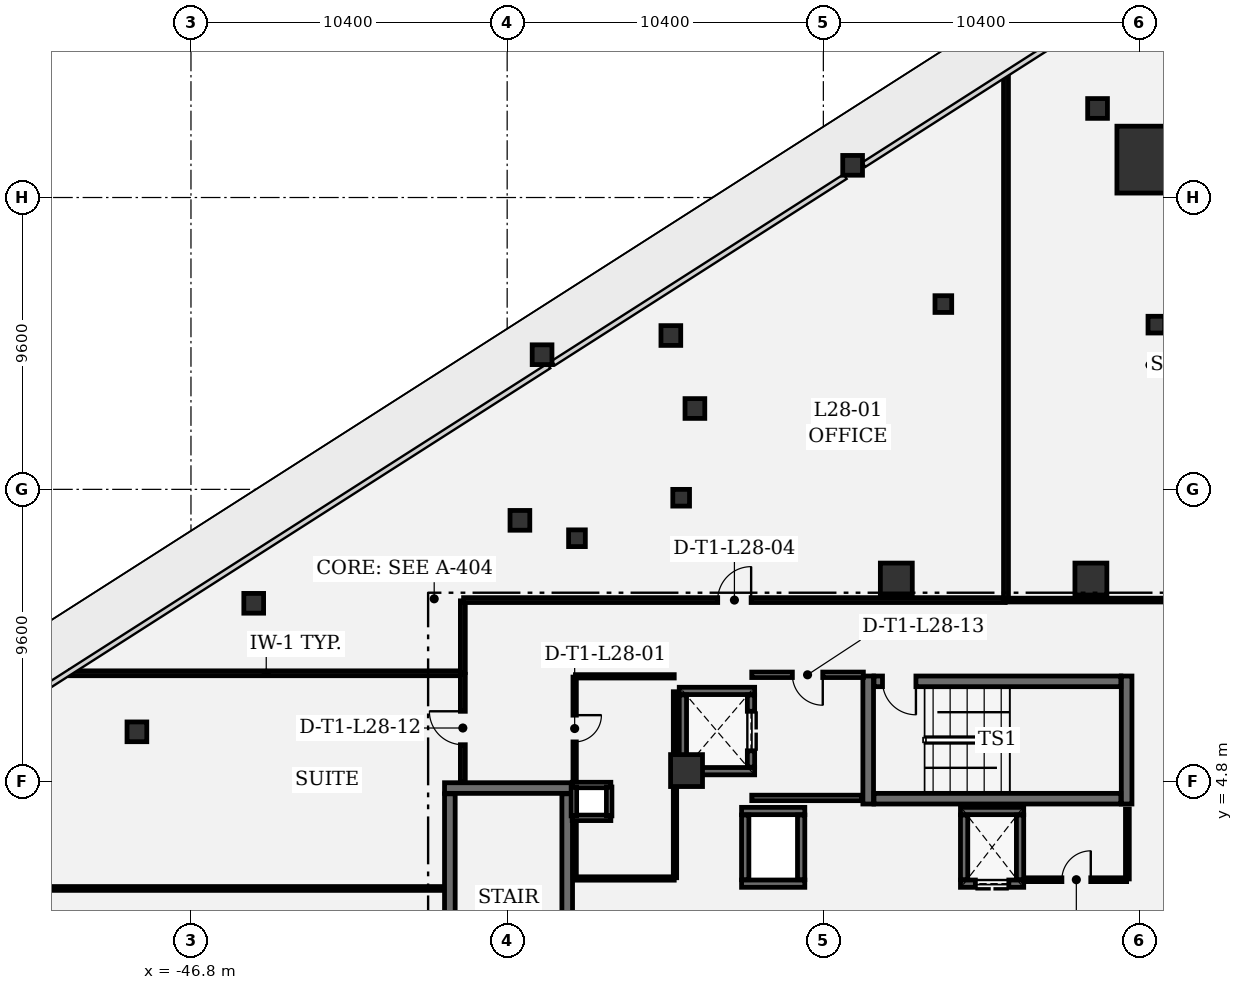
"""IFC4 building model, lengths in metres.
Left out: names, types, materials, properties, quantities, classifications, styles, units other than length and angle.
Written with IfcOpenShell. Run it as: python <this file> out.ifc"""

import sys

from ifc_helpers import new_model, si_unit, direction, frame, frame_2d, origin, origin_2d, place, context, subcontext, project, spatial, rectangle, extrude, element, fill, save


model = new_model("IFC4")
c1 = context("Model", 3, precision=1e-05, world=origin(), true_north=direction((0.0, 1.0)))
c2 = subcontext(c1, "Body", "Model", "MODEL_VIEW")
j1 = project(units=[si_unit("LENGTHUNIT", "METRE"), si_unit("PLANEANGLEUNIT", "RADIAN")], contexts=[c1])
p1 = place(None, origin())
s1 = spatial("IfcSite", under=j1, at=p1, CompositionType="ELEMENT")
p2 = place(p1, origin())
s2 = spatial("IfcBuilding", under=s1, at=p2, CompositionType="ELEMENT")
p3 = place(p2, frame((0.0, 0.0, 126.0)))
s3 = spatial("IfcBuildingStorey", under=s2, at=p3, CompositionType="ELEMENT", Elevation=126.0)
p4 = place(p3, frame((-15.344, 25.246, 0.0), z_axis=(0.0, 0.0, 1.0), x_axis=(1.0, 0.0, 0.0)))
e1 = element("IfcColumn", 1, at=p4, inside=s3, PredefinedType="COLUMN", context=c2, shape_type="SweptSolid", body=[
    extrude(rectangle(XDim=2.0, YDim=2.2, at=origin_2d()), origin(), (0.0, 0.0, 1.0), 4.05),
])
for number, where, z_axis, x_axis in (
    (2, (-23.6, 11.45, 0.0), (0.0, 0.0, 1.0), (1.0, 0.0, 0.0)),
    (3, (-17.2, 11.45, 0.0), (0.0, 0.0, 1.0), (1.0, 0.0, 0.0)),
    (4, (-30.5, 5.15, 0.0), (0.0, 0.0, 1.0), (1.0, 0.0, 0.0)),
):
    element("IfcColumn", number, at=place(p3, frame(where, z_axis=z_axis, x_axis=x_axis)), inside=s3, PredefinedType="COLUMN", context=c2, shape_type="SweptSolid", body=[
        extrude(rectangle(XDim=1.05, YDim=1.05, at=origin_2d()), origin(), (0.0, 0.0, 1.0), 4.05),
    ])
for number, where, z_axis, x_axis in (
    (5, (-35.252, 18.829, 0.0), (0.0, 0.0, 1.0), (1.0, 0.0, 0.0)),
    (6, (-25.038, 25.059, 0.0), (0.0, 0.0, 1.0), (1.0, 0.0, 0.0)),
    (7, (-31.016, 19.46, 0.0), (0.0, 0.0, 1.0), (1.0, 0.0, 0.0)),
    (8, (-44.736, 10.652, 0.0), (0.0, 0.0, 1.0), (1.0, 0.0, 0.0)),
    (9, (-48.578, 6.425, 0.0), (0.0, 0.0, 1.0), (1.0, 0.0, 0.0)),
    (10, (-16.981, 26.929, 0.0), (0.0, 0.0, 1.0), (1.0, 0.0, 0.0)),
    (11, (-35.981, 13.381, 0.0), (0.0, 0.0, 1.0), (1.0, 0.0, 0.0)),
    (12, (-30.225, 17.06, 0.0), (0.0, 0.0, 1.0), (1.0, 0.0, 0.0)),
):
    element("IfcColumn", number, at=place(p3, frame(where, z_axis=z_axis, x_axis=x_axis)), inside=s3, PredefinedType="COLUMN", context=c2, shape_type="SweptSolid", body=[
        extrude(rectangle(XDim=0.65, YDim=0.65, at=origin_2d()), origin(), (0.0, 0.0, 1.0), 4.05),
    ])
for number, where, z_axis, x_axis in (
    (13, (-34.104, 12.792, 0.0), (0.0, 0.0, 1.0), (1.0, 0.0, 0.0)),
    (14, (-22.053, 20.495, 0.0), (0.0, 0.0, 1.0), (1.0, 0.0, 0.0)),
    (15, (-30.677, 14.124, 0.0), (0.0, 0.0, 1.0), (1.0, 0.0, 0.0)),
    (16, (-15.046, 19.818, 0.0), (0.0, 0.0, 1.0), (1.0, 0.0, 0.0)),
):
    element("IfcColumn", number, at=place(p3, frame(where, z_axis=z_axis, x_axis=x_axis)), inside=s3, PredefinedType="COLUMN", context=c2, shape_type="SweptSolid", body=[
        extrude(rectangle(XDim=0.55, YDim=0.55, at=origin_2d()), origin(), (0.0, 0.0, 1.0), 4.05),
    ])
for number, where, z_axis, x_axis in (
    (17, (-24.525, 8.26, 0.0), (0.0, 0.0, 1.0), (0.0, -1.0, 0.0)),
    (18, (-16.025, 4.05, 0.0), (0.0, 0.0, 1.0), (0.0, 1.0, 0.0)),
):
    element("IfcWall", number, at=place(p3, frame(where, z_axis=z_axis, x_axis=x_axis)), inside=s3, PredefinedType="SHEAR", context=c2, shape_type="SweptSolid", body=[
        extrude(rectangle(XDim=4.21, YDim=0.35, at=frame_2d((2.105, 0.0))), origin(), (0.0, 0.0, 1.0), 3.77),
    ])
p5 = place(p3, frame((-24.335, 4.225, 0.0), z_axis=(0.0, 0.0, 1.0), x_axis=(1.0, 0.0, 0.0)))
e19 = element("IfcWall", 19, at=p5, inside=s3, PredefinedType="SHEAR", context=c2, shape_type="SweptSolid", body=[
    extrude(rectangle(XDim=8.12, YDim=0.35, at=frame_2d((4.06, 0.0))), origin(), (0.0, 0.0, 1.0), 3.77),
])
p6 = place(p3, frame((-16.215, 8.085, 0.0), z_axis=(0.0, 0.0, 1.0), x_axis=(-1.0, 0.0, 0.0)))
e20 = element("IfcWall", 20, at=p6, inside=s3, PredefinedType="SHEAR", context=c2, shape_type="SweptSolid", body=[
    extrude(rectangle(XDim=8.12, YDim=0.35, at=frame_2d((4.06, 0.0))), origin(), (0.0, 0.0, 1.0), 3.77),
])
p7 = place(p6, frame((6.74, 0.0, 0.0)))
e21 = element("IfcOpeningElement", 21, at=p7, cuts=e20, PredefinedType="OPENING", context=c2, shape_type="SweptSolid", body=[
    extrude(rectangle(XDim=1.1, YDim=2.2, at=frame_2d((0.55, 1.1))), frame((0.0, 0.185, 0.0), z_axis=(0.0, -1.0, 0.0), x_axis=(1.0, 0.0, 0.0)), (0.0, 0.0, 1.0), 0.37),
])
p8 = place(p3, frame((-34.25, 4.575, 0.0), z_axis=(0.0, 0.0, 1.0), x_axis=(-1.0, 0.0, 0.0)))
e22 = element("IfcWall", 22, at=p8, inside=s3, PredefinedType="SHEAR", context=c2, shape_type="SweptSolid", body=[
    extrude(rectangle(XDim=4.21, YDim=0.35, at=frame_2d((2.105, 0.0))), origin(), (0.0, 0.0, 1.0), 3.77),
])
for number, where, z_axis, x_axis in (
    (23, (-34.425, -4.385, 0.0), (0.0, 0.0, 1.0), (0.0, 1.0, 0.0)),
    (24, (-38.285, 4.385, 0.0), (0.0, 0.0, 1.0), (0.0, -1.0, 0.0)),
):
    element("IfcWall", number, at=place(p3, frame(where, z_axis=z_axis, x_axis=x_axis)), inside=s3, PredefinedType="SHEAR", context=c2, shape_type="SweptSolid", body=[
        extrude(rectangle(XDim=8.77, YDim=0.35, at=frame_2d((4.385, 0.0))), origin(), (0.0, 0.0, 1.0), 3.77),
    ])
for number, where, z_axis, x_axis in (
    (25, (-28.26, 5.13, 0.0), (0.0, 0.0, 1.0), (-1.0, 0.0, 0.0)),
    (26, (-30.74, 7.77, 0.0), (0.0, 0.0, 1.0), (1.0, 0.0, 0.0)),
):
    element("IfcWall", number, at=place(p3, frame(where, z_axis=z_axis, x_axis=x_axis)), inside=s3, PredefinedType="SHEAR", context=c2, shape_type="SweptSolid", body=[
        extrude(rectangle(XDim=2.48, YDim=0.24, at=frame_2d((1.24, 0.0))), origin(), (0.0, 0.0, 1.0), 3.77),
    ])
p9 = place(p3, frame((-30.62, 5.262, 0.0), z_axis=(0.0, 0.0, 1.0), x_axis=(0.0, 1.0, 0.0)))
e27 = element("IfcWall", 27, at=p9, inside=s3, PredefinedType="SHEAR", context=c2, shape_type="SweptSolid", body=[
    extrude(rectangle(XDim=2.376, YDim=0.24, at=frame_2d((1.188, 0.0))), origin(), (0.0, 0.0, 1.0), 3.77),
])
p10 = place(p3, frame((-28.38, 7.638, 0.0), z_axis=(0.0, 0.0, 1.0), x_axis=(0.0, -1.0, 0.0)))
e28 = element("IfcWall", 28, at=p10, inside=s3, PredefinedType="SHEAR", context=c2, shape_type="SweptSolid", body=[
    extrude(rectangle(XDim=2.376, YDim=0.24, at=frame_2d((1.188, 0.0))), origin(), (0.0, 0.0, 1.0), 3.77),
])
p11 = place(p10, frame((0.538, 0.0, 0.0)))
e29 = element("IfcOpeningElement", 29, at=p11, cuts=e28, PredefinedType="OPENING", context=c2, shape_type="SweptSolid", body=[
    extrude(rectangle(XDim=1.3, YDim=2.3, at=frame_2d((0.65, 1.15))), frame((0.0, 0.13, 0.0), z_axis=(0.0, -1.0, 0.0), x_axis=(1.0, 0.0, 0.0)), (0.0, 0.0, 1.0), 0.26),
])
for number, where, z_axis, x_axis in (
    (30, (-26.61, 1.43, 0.0), (0.0, 0.0, 1.0), (-1.0, 0.0, 0.0)),
    (31, (-28.69, 3.82, 0.0), (0.0, 0.0, 1.0), (1.0, 0.0, 0.0)),
):
    element("IfcWall", number, at=place(p3, frame(where, z_axis=z_axis, x_axis=x_axis)), inside=s3, PredefinedType="SHEAR", context=c2, shape_type="SweptSolid", body=[
        extrude(rectangle(XDim=2.08, YDim=0.24, at=frame_2d((1.04, 0.0))), origin(), (0.0, 0.0, 1.0), 3.77),
    ])
for number, where, z_axis, x_axis in (
    (32, (-28.57, 1.562, 0.0), (0.0, 0.0, 1.0), (0.0, 1.0, 0.0)),
    (33, (-26.73, 3.688, 0.0), (0.0, 0.0, 1.0), (0.0, -1.0, 0.0)),
):
    element("IfcWall", number, at=place(p3, frame(where, z_axis=z_axis, x_axis=x_axis)), inside=s3, PredefinedType="SHEAR", context=c2, shape_type="SweptSolid", body=[
        extrude(rectangle(XDim=2.126, YDim=0.24, at=frame_2d((1.063, 0.0))), origin(), (0.0, 0.0, 1.0), 3.77),
    ])
p12 = place(p3, frame((-19.41, 1.43, 0.0), z_axis=(0.0, 0.0, 1.0), x_axis=(-1.0, 0.0, 0.0)))
e34 = element("IfcWall", 34, at=p12, inside=s3, PredefinedType="SHEAR", context=c2, shape_type="SweptSolid", body=[
    extrude(rectangle(XDim=2.08, YDim=0.24, at=frame_2d((1.04, 0.0))), origin(), (0.0, 0.0, 1.0), 3.77),
])
p13 = place(p12, frame((0.49, 0.0, 0.0)))
e35 = element("IfcOpeningElement", 35, at=p13, cuts=e34, PredefinedType="OPENING", context=c2, shape_type="SweptSolid", body=[
    extrude(rectangle(XDim=1.1, YDim=2.2, at=frame_2d((0.55, 1.1))), frame((0.0, 0.13, 0.0), z_axis=(0.0, -1.0, 0.0), x_axis=(1.0, 0.0, 0.0)), (0.0, 0.0, 1.0), 0.26),
])
p14 = place(p3, frame((-21.49, 3.82, 0.0), z_axis=(0.0, 0.0, 1.0), x_axis=(1.0, 0.0, 0.0)))
e36 = element("IfcWall", 36, at=p14, inside=s3, PredefinedType="SHEAR", context=c2, shape_type="SweptSolid", body=[
    extrude(rectangle(XDim=2.08, YDim=0.24, at=frame_2d((1.04, 0.0))), origin(), (0.0, 0.0, 1.0), 3.77),
])
for number, where, z_axis, x_axis in (
    (37, (-21.37, 1.562, 0.0), (0.0, 0.0, 1.0), (0.0, 1.0, 0.0)),
    (38, (-19.53, 3.688, 0.0), (0.0, 0.0, 1.0), (0.0, -1.0, 0.0)),
):
    element("IfcWall", number, at=place(p3, frame(where, z_axis=z_axis, x_axis=x_axis)), inside=s3, PredefinedType="SHEAR", context=c2, shape_type="SweptSolid", body=[
        extrude(rectangle(XDim=2.126, YDim=0.24, at=frame_2d((1.063, 0.0))), origin(), (0.0, 0.0, 1.0), 3.77),
    ])
for number, where, z_axis, x_axis in (
    (39, (-32.99, 3.595, 0.0), (0.0, 0.0, 1.0), (-1.0, 0.0, 0.0)),
    (40, (-34.26, 4.675, 0.0), (0.0, 0.0, 1.0), (1.0, 0.0, 0.0)),
):
    element("IfcWall", number, at=place(p3, frame(where, z_axis=z_axis, x_axis=x_axis)), inside=s3, PredefinedType="PARTITIONING", context=c2, shape_type="SweptSolid", body=[
        extrude(rectangle(XDim=1.27, YDim=0.18, at=frame_2d((0.635, 0.0))), origin(), (0.0, 0.0, 1.0), 3.77),
    ])
for number, where, z_axis, x_axis in (
    (41, (-34.205, 3.66, 0.0), (0.0, 0.0, 1.0), (0.0, 1.0, 0.0)),
    (42, (-33.045, 4.61, 0.0), (0.0, 0.0, 1.0), (0.0, -1.0, 0.0)),
):
    element("IfcWall", number, at=place(p3, frame(where, z_axis=z_axis, x_axis=x_axis)), inside=s3, PredefinedType="PARTITIONING", context=c2, shape_type="SweptSolid", body=[
        extrude(rectangle(XDim=0.95, YDim=0.18, at=frame_2d((0.475, 0.0))), origin(), (0.0, 0.0, 1.0), 3.77),
    ])
p15 = place(p3, frame((-28.355, 4.25, 0.0), z_axis=(0.0, 0.0, 1.0), x_axis=(1.0, 0.0, 0.0)))
e43 = element("IfcWall", 43, at=p15, inside=s3, PredefinedType="PARTITIONING", context=c2, shape_type="SweptSolid", body=[
    extrude(rectangle(XDim=3.622, YDim=0.18, at=frame_2d((1.811, 0.0))), origin(), (0.0, 0.0, 1.0), 3.77),
])
p16 = place(p3, frame((-24.684, 8.3, 0.0), z_axis=(0.0, 0.0, 1.0), x_axis=(-1.0, 0.0, 0.0)))
e44 = element("IfcWall", 44, at=p16, inside=s3, PredefinedType="PARTITIONING", context=c2, shape_type="SweptSolid", body=[
    extrude(rectangle(XDim=3.671, YDim=0.18, at=frame_2d((1.835, 0.0))), origin(), (0.0, 0.0, 1.0), 3.77),
])
p17 = place(p16, frame((1.335, 0.0, 0.0)))
e45 = element("IfcOpeningElement", 45, at=p17, cuts=e44, PredefinedType="OPENING", context=c2, shape_type="SweptSolid", body=[
    extrude(rectangle(XDim=1.0, YDim=2.15, at=frame_2d((0.5, 1.075))), frame((0.0, 0.1, 0.0), z_axis=(0.0, -1.0, 0.0), x_axis=(1.0, 0.0, 0.0)), (0.0, 0.0, 1.0), 0.2),
])
p18 = place(p3, frame((-34.155, 1.6, 0.0), z_axis=(0.0, 0.0, 1.0), x_axis=(1.0, 0.0, 0.0)))
e46 = element("IfcWall", 46, at=p18, inside=s3, PredefinedType="PARTITIONING", context=c2, shape_type="SweptSolid", body=[
    extrude(rectangle(XDim=3.25, YDim=0.11, at=frame_2d((1.625, 0.0))), origin(), (0.0, 0.0, 1.0), 3.77),
])
p19 = place(p3, frame((-30.88, 1.625, 0.0), z_axis=(0.0, 0.0, 1.0), x_axis=(0.0, 1.0, 0.0)))
e47 = element("IfcWall", 47, at=p19, inside=s3, PredefinedType="PARTITIONING", context=c2, shape_type="SweptSolid", body=[
    extrude(rectangle(XDim=2.935, YDim=0.11, at=frame_2d((1.468, 0.0))), origin(), (0.0, 0.0, 1.0), 3.77),
])
p20 = place(p3, frame((-30.88, 5.74, 0.0), z_axis=(0.0, 0.0, 1.0), x_axis=(0.0, 1.0, 0.0)))
e48 = element("IfcWall", 48, at=p20, inside=s3, PredefinedType="PARTITIONING", context=c2, shape_type="SweptSolid", body=[
    extrude(rectangle(XDim=2.003, YDim=0.11, at=frame_2d((1.001, 0.0))), origin(), (0.0, 0.0, 1.0), 3.77),
])
p21 = place(p3, frame((-30.905, 8.25, 0.0), z_axis=(0.0, 0.0, 1.0), x_axis=(-1.0, 0.0, 0.0)))
e49 = element("IfcWall", 49, at=p21, inside=s3, PredefinedType="PARTITIONING", context=c2, shape_type="SweptSolid", body=[
    extrude(rectangle(XDim=3.25, YDim=0.11, at=frame_2d((1.625, 0.0))), origin(), (0.0, 0.0, 1.0), 3.77),
])
p22 = place(p3, frame((-34.18, 8.225, 0.0), z_axis=(0.0, 0.0, 1.0), x_axis=(0.0, -1.0, 0.0)))
e50 = element("IfcWall", 50, at=p22, inside=s3, PredefinedType="PARTITIONING", context=c2, shape_type="SweptSolid", body=[
    extrude(rectangle(XDim=3.385, YDim=0.11, at=frame_2d((1.692, 0.0))), origin(), (0.0, 0.0, 1.0), 3.77),
])
p23 = place(p22, frame((1.252, 0.0, 0.0)))
e51 = element("IfcOpeningElement", 51, at=p23, cuts=e50, PredefinedType="OPENING", context=c2, shape_type="SweptSolid", body=[
    extrude(rectangle(XDim=0.88, YDim=2.1, at=frame_2d((0.44, 1.05))), frame((0.0, 0.065, 0.0), z_axis=(0.0, -1.0, 0.0), x_axis=(1.0, 0.0, 0.0)), (0.0, 0.0, 1.0), 0.13),
])
p24 = place(p3, frame((-34.18, 3.43, 0.0), z_axis=(0.0, 0.0, 1.0), x_axis=(0.0, -1.0, 0.0)))
e52 = element("IfcWall", 52, at=p24, inside=s3, PredefinedType="PARTITIONING", context=c2, shape_type="SweptSolid", body=[
    extrude(rectangle(XDim=1.805, YDim=0.11, at=frame_2d((0.902, 0.0))), origin(), (0.0, 0.0, 1.0), 3.77),
])
p25 = place(p3, frame((-19.334, 1.56, 0.0), z_axis=(0.0, 0.0, 1.0), x_axis=(1.0, 0.0, 0.0)))
e53 = element("IfcWall", 53, at=p25, inside=s3, PredefinedType="PARTITIONING", context=c2, shape_type="SweptSolid", body=[
    extrude(rectangle(XDim=3.309, YDim=0.125, at=frame_2d((1.654, 0.0))), origin(), (0.0, 0.0, 1.0), 3.77),
])
p26 = place(p25, frame((1.179, 0.0, 0.0)))
e54 = element("IfcOpeningElement", 54, at=p26, cuts=e53, PredefinedType="OPENING", context=c2, shape_type="SweptSolid", body=[
    extrude(rectangle(XDim=0.95, YDim=2.15, at=frame_2d((0.475, 1.075))), frame((0.0, 0.073, 0.0), z_axis=(0.0, -1.0, 0.0), x_axis=(1.0, 0.0, 0.0)), (0.0, 0.0, 1.0), 0.145),
])
p27 = place(p3, frame((-16.0, 1.585, 0.0), z_axis=(0.0, 0.0, 1.0), x_axis=(0.0, 1.0, 0.0)))
e55 = element("IfcWall", 55, at=p27, inside=s3, PredefinedType="PARTITIONING", context=c2, shape_type="SweptSolid", body=[
    extrude(rectangle(XDim=2.302, YDim=0.125, at=frame_2d((1.151, 0.0))), origin(), (0.0, 0.0, 1.0), 3.77),
])
p28 = place(p3, frame((-50.766, 8.35, 0.0), z_axis=(0.0, 0.0, 1.0), x_axis=(1.0, 0.0, 0.0)))
e56 = element("IfcWall", 56, at=p28, inside=s3, PredefinedType="PARTITIONING", context=c2, shape_type="SweptSolid", body=[
    extrude(rectangle(XDim=12.883, YDim=0.16, at=frame_2d((6.442, 0.0))), origin(), (0.0, 0.0, 1.0), 2.89),
])
p29 = place(p3, frame((-37.858, 10.733, 0.0), z_axis=(0.0, 0.0, 1.0), x_axis=(0.0, -1.0, 0.0)))
e57 = element("IfcWall", 57, at=p29, inside=s3, PredefinedType="PARTITIONING", context=c2, shape_type="SweptSolid", body=[
    extrude(rectangle(XDim=2.358, YDim=0.16, at=frame_2d((1.179, 0.0))), origin(), (0.0, 0.0, 1.0), 3.77),
])
p30 = place(p3, frame((-37.833, 10.758, 0.0), z_axis=(0.0, 0.0, 1.0), x_axis=(1.0, 0.0, 0.0)))
e58 = element("IfcWall", 58, at=p30, inside=s3, PredefinedType="PARTITIONING", context=c2, shape_type="SweptSolid", body=[
    extrude(rectangle(XDim=17.815, YDim=0.16, at=frame_2d((8.908, 0.0))), origin(), (0.0, 0.0, 1.0), 3.334),
])
p31 = place(p30, frame((8.358, 0.0, 0.0)))
e59 = element("IfcOpeningElement", 59, at=p31, cuts=e58, PredefinedType="OPENING", context=c2, shape_type="SweptSolid", body=[
    extrude(rectangle(XDim=1.1, YDim=2.15, at=frame_2d((0.55, 1.075))), frame((0.0, 0.09, 0.0), z_axis=(0.0, -1.0, 0.0), x_axis=(1.0, 0.0, 0.0)), (0.0, 0.0, 1.0), 0.18),
])
p32 = place(p3, frame((-19.993, 10.783, 0.0), z_axis=(0.0, 0.0, 1.0), x_axis=(0.0, 1.0, 0.0)))
e60 = element("IfcWall", 60, at=p32, inside=s3, PredefinedType="PARTITIONING", context=c2, shape_type="SweptSolid", body=[
    extrude(rectangle(XDim=17.206, YDim=0.16, at=frame_2d((8.603, 0.0))), origin(), (0.0, 0.0, 1.0), 2.885),
])
p33 = place(p3, frame((-19.96, 10.758, 0.0), z_axis=(0.0, 0.0, 1.0), x_axis=(1.0, 0.0, 0.0)))
e61 = element("IfcWall", 61, at=p33, inside=s3, PredefinedType="PARTITIONING", context=c2, shape_type="SweptSolid", body=[
    extrude(rectangle(XDim=23.24, YDim=0.125, at=frame_2d((11.62, 0.0))), origin(), (0.0, 0.0, 1.0), 2.885),
])
p34 = place(p33, frame((11.145, 0.0, 0.0)))
e62 = element("IfcOpeningElement", 62, at=p34, cuts=e61, PredefinedType="OPENING", context=c2, shape_type="SweptSolid", body=[
    extrude(rectangle(XDim=0.95, YDim=2.15, at=frame_2d((0.475, 1.075))), frame((0.0, 0.073, 0.0), z_axis=(0.0, -1.0, 0.0), x_axis=(1.0, 0.0, 0.0)), (0.0, 0.0, 1.0), 0.145),
])
p35 = place(p3, frame((-38.493, 1.271, 0.0), z_axis=(0.0, 0.0, 1.0), x_axis=(-0.999999998722, 5.0556756e-05, 0.0)))
e63 = element("IfcWall", 63, at=p35, inside=s3, PredefinedType="PARTITIONING", context=c2, shape_type="SweptSolid", body=[
    extrude(rectangle(XDim=19.316, YDim=0.125, at=frame_2d((9.658, 0.0))), origin(), (0.0, 0.0, 1.0), 3.77),
])
p36 = place(p3, frame((-37.858, 4.783, 0.0), z_axis=(0.0, 0.0, 1.0), x_axis=(0.0, 1.0, 0.0)))
e64 = element("IfcWall", 64, at=p36, inside=s3, PredefinedType="PARTITIONING", context=c2, shape_type="SweptSolid", body=[
    extrude(rectangle(XDim=3.534, YDim=0.16, at=frame_2d((1.767, 0.0))), origin(), (0.0, 0.0, 1.0), 3.77),
])
p37 = place(p36, frame((1.217, 0.0, 0.0)))
e65 = element("IfcOpeningElement", 65, at=p37, cuts=e64, PredefinedType="OPENING", context=c2, shape_type="SweptSolid", body=[
    extrude(rectangle(XDim=1.1, YDim=2.15, at=frame_2d((0.55, 1.075))), frame((0.0, 0.09, 0.0), z_axis=(0.0, -1.0, 0.0), x_axis=(1.0, 0.0, 0.0)), (0.0, 0.0, 1.0), 0.18),
])
p38 = place(p7, origin())
e66 = element("IfcDoor", 66, at=p38, inside=s3, OperationType="SINGLE_SWING_LEFT", PredefinedType="DOOR", context=c2, shape_type="SweptSolid", body=[
    extrude(rectangle(XDim=1.1, YDim=2.2, at=frame_2d((0.55, 1.1))), frame((0.0, 0.025, 0.0), z_axis=(0.0, -1.0, 0.0), x_axis=(1.0, 0.0, 0.0)), (0.0, 0.0, 1.0), 0.05),
])
fill(e21, e66)
p39 = place(p11, origin())
e67 = element("IfcDoor", 67, at=p39, inside=s3, OperationType="DOUBLE_DOOR_SLIDING", PredefinedType="DOOR", context=c2, shape_type="SweptSolid", body=[
    extrude(rectangle(XDim=1.3, YDim=2.3, at=frame_2d((0.65, 1.15))), frame((0.0, 0.025, 0.0), z_axis=(0.0, -1.0, 0.0), x_axis=(1.0, 0.0, 0.0)), (0.0, 0.0, 1.0), 0.05),
])
fill(e29, e67)
p40 = place(p13, origin())
e68 = element("IfcDoor", 68, at=p40, inside=s3, OperationType="DOUBLE_DOOR_SLIDING", PredefinedType="DOOR", context=c2, shape_type="SweptSolid", body=[
    extrude(rectangle(XDim=1.1, YDim=2.2, at=frame_2d((0.55, 1.1))), frame((0.0, 0.025, 0.0), z_axis=(0.0, -1.0, 0.0), x_axis=(1.0, 0.0, 0.0)), (0.0, 0.0, 1.0), 0.05),
])
fill(e35, e68)
p41 = place(p23, origin())
e69 = element("IfcDoor", 69, at=p41, inside=s3, OperationType="SINGLE_SWING_LEFT", PredefinedType="DOOR", context=c2, shape_type="SweptSolid", body=[
    extrude(rectangle(XDim=0.88, YDim=2.1, at=frame_2d((0.44, 1.05))), frame((0.0, 0.025, 0.0), z_axis=(0.0, -1.0, 0.0), x_axis=(1.0, 0.0, 0.0)), (0.0, 0.0, 1.0), 0.05),
])
fill(e51, e69)
p42 = place(p26, origin())
e70 = element("IfcDoor", 70, at=p42, inside=s3, OperationType="SINGLE_SWING_RIGHT", PredefinedType="DOOR", context=c2, shape_type="SweptSolid", body=[
    extrude(rectangle(XDim=0.95, YDim=2.15, at=frame_2d((0.475, 1.075))), frame((0.0, 0.025, 0.0), z_axis=(0.0, -1.0, 0.0), x_axis=(1.0, 0.0, 0.0)), (0.0, 0.0, 1.0), 0.05),
])
fill(e54, e70)
p43 = place(p31, origin())
e71 = element("IfcDoor", 71, at=p43, inside=s3, OperationType="SINGLE_SWING_RIGHT", PredefinedType="DOOR", context=c2, shape_type="SweptSolid", body=[
    extrude(rectangle(XDim=1.1, YDim=2.15, at=frame_2d((0.55, 1.075))), frame((0.0, 0.025, 0.0), z_axis=(0.0, -1.0, 0.0), x_axis=(1.0, 0.0, 0.0)), (0.0, 0.0, 1.0), 0.05),
])
fill(e59, e71)
p44 = place(p37, origin())
e72 = element("IfcDoor", 72, at=p44, inside=s3, OperationType="SINGLE_SWING_RIGHT", PredefinedType="DOOR", context=c2, shape_type="SweptSolid", body=[
    extrude(rectangle(XDim=1.1, YDim=2.15, at=frame_2d((0.55, 1.075))), frame((0.0, 0.025, 0.0), z_axis=(0.0, -1.0, 0.0), x_axis=(1.0, 0.0, 0.0)), (0.0, 0.0, 1.0), 0.05),
])
fill(e65, e72)
p45 = place(p17, origin())
e73 = element("IfcDoor", 73, at=p45, inside=s3, OperationType="SINGLE_SWING_LEFT", PredefinedType="DOOR", context=c2, shape_type="SweptSolid", body=[
    extrude(rectangle(XDim=1.0, YDim=2.15, at=frame_2d((0.5, 1.075))), frame((0.0, 0.025, 0.0), z_axis=(0.0, -1.0, 0.0), x_axis=(1.0, 0.0, 0.0)), (0.0, 0.0, 1.0), 0.05),
])
fill(e45, e73)
save(model, sys.argv[1])
